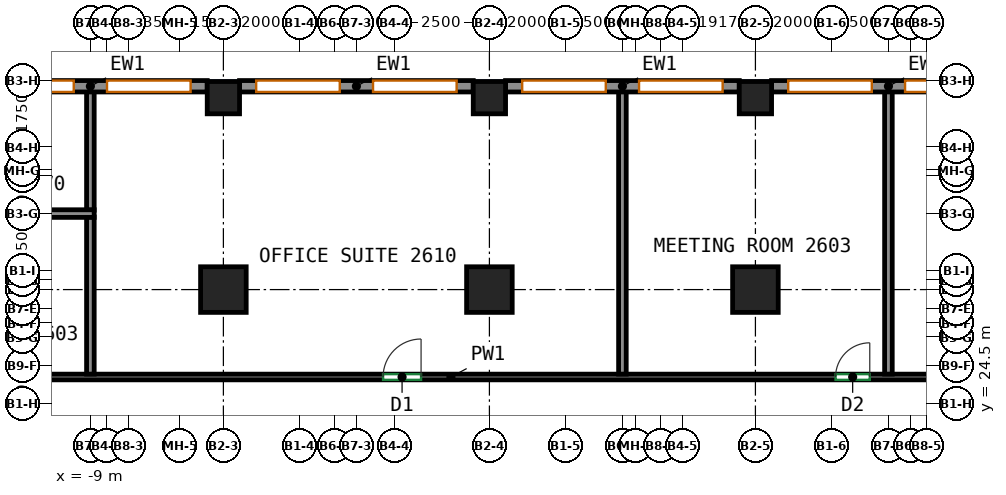
"""IFC4 building model, lengths in metres.
Left out: names, types, materials, properties, quantities, classifications, styles, units other than length and angle.
Written with IfcOpenShell. Run it as: python <this file> out.ifc"""

import sys

from ifc_helpers import new_model, si_unit, direction, frame, frame_2d, origin, origin_2d, place, context, subcontext, project, spatial, rectangle, extrude, source, transform, mapped, element, fill, save


model = new_model("IFC4")
c1 = context("Model", 3, precision=1e-05, world=origin(), true_north=direction((0.0, 1.0)))
c2 = subcontext(c1, "Body", "Model", "MODEL_VIEW")
j1 = project(units=[si_unit("LENGTHUNIT", "METRE"), si_unit("PLANEANGLEUNIT", "RADIAN")], contexts=[c1])
p1 = place(None, origin())
s1 = spatial("IfcSite", under=j1, at=p1, CompositionType="ELEMENT")
p2 = place(p1, origin())
s2 = spatial("IfcBuilding", under=s1, at=p2, CompositionType="ELEMENT")
p3 = place(p2, frame((0.0, 0.0, 112.6)))
s3 = spatial("IfcBuildingStorey", under=s2, at=p3, CompositionType="ELEMENT", Elevation=112.6)
m1 = source(origin(), c2, "Body", "SweptSolid", [
    extrude(rectangle(XDim=1.2, YDim=1.2, at=origin_2d()), origin(), (0.0, 0.0, 1.0), 3.72),
])
p4 = place(p3, frame((-5.5, 27.5, 0.0), z_axis=(0.0, 0.0, 1.0), x_axis=(1.0, 0.0, 0.0)))
e1 = element("IfcColumn", 1, at=p4, inside=s3, PredefinedType="COLUMN", context=c2, shape_type="MappedRepresentation", body=[
    mapped(m1, transform((0.0, 0.0, 0.0))),
])
m2 = source(origin(), c2, "Body", "SweptSolid", [
    extrude(rectangle(XDim=0.85, YDim=0.85, at=origin_2d()), origin(), (0.0, 0.0, 1.0), 3.72),
])
p5 = place(p3, frame((-5.5, 32.55, 0.0), z_axis=(0.0, 0.0, 1.0), x_axis=(1.0, 0.0, 0.0)))
e2 = element("IfcColumn", 2, at=p5, inside=s3, PredefinedType="COLUMN", context=c2, shape_type="MappedRepresentation", body=[
    mapped(m2, transform((0.0, 0.0, 0.0))),
])
p6 = place(p3, frame((1.5, 27.5, 0.0), z_axis=(0.0, 0.0, 1.0), x_axis=(1.0, 0.0, 0.0)))
e3 = element("IfcColumn", 3, at=p6, inside=s3, PredefinedType="COLUMN", context=c2, shape_type="MappedRepresentation", body=[
    mapped(m1, transform((0.0, 0.0, 0.0))),
])
p7 = place(p3, frame((1.5, 32.55, 0.0), z_axis=(0.0, 0.0, 1.0), x_axis=(1.0, 0.0, 0.0)))
e4 = element("IfcColumn", 4, at=p7, inside=s3, PredefinedType="COLUMN", context=c2, shape_type="MappedRepresentation", body=[
    mapped(m2, transform((0.0, 0.0, 0.0))),
])
p8 = place(p3, frame((8.5, 27.5, 0.0), z_axis=(0.0, 0.0, 1.0), x_axis=(1.0, 0.0, 0.0)))
e5 = element("IfcColumn", 5, at=p8, inside=s3, PredefinedType="COLUMN", context=c2, shape_type="MappedRepresentation", body=[
    mapped(m1, transform((0.0, 0.0, 0.0))),
])
p9 = place(p3, frame((8.5, 32.55, 0.0), z_axis=(0.0, 0.0, 1.0), x_axis=(1.0, 0.0, 0.0)))
e6 = element("IfcColumn", 6, at=p9, inside=s3, PredefinedType="COLUMN", context=c2, shape_type="MappedRepresentation", body=[
    mapped(m2, transform((0.0, 0.0, 0.0))),
])
m3 = source(origin(), c2, "Body", "SweptSolid", [
    extrude(rectangle(XDim=6.15, YDim=0.3, at=frame_2d((3.075, 0.0))), origin(), (0.0, 0.0, 1.0), 3.72),
])
p10 = place(p3, frame((15.075, 32.85, 0.0), z_axis=(0.0, 0.0, 1.0), x_axis=(-1.0, 0.0, 0.0)))
e7 = element("IfcWall", 7, at=p10, inside=s3, PredefinedType="SOLIDWALL", context=c2, shape_type="MappedRepresentation", body=[
    mapped(m3, transform((0.0, 0.0, 0.0))),
])
p11 = place(p10, frame((0.438, 0.0, 0.7)))
e8 = element("IfcOpeningElement", 8, at=p11, cuts=e7, PredefinedType="OPENING", context=c2, shape_type="SweptSolid", body=[
    extrude(rectangle(XDim=2.2, YDim=2.25, at=frame_2d((1.1, 1.125))), frame((0.0, 0.16, 0.0), z_axis=(0.0, -1.0, 0.0), x_axis=(1.0, 0.0, 0.0)), (0.0, 0.0, 1.0), 0.32),
])
p12 = place(p10, frame((3.512, 0.0, 0.7)))
e9 = element("IfcOpeningElement", 9, at=p12, cuts=e7, PredefinedType="OPENING", context=c2, shape_type="SweptSolid", body=[
    extrude(rectangle(XDim=2.2, YDim=2.25, at=frame_2d((1.1, 1.125))), frame((0.0, 0.16, 0.0), z_axis=(0.0, -1.0, 0.0), x_axis=(1.0, 0.0, 0.0)), (0.0, 0.0, 1.0), 0.32),
])
p13 = place(p3, frame((8.075, 32.85, 0.0), z_axis=(0.0, 0.0, 1.0), x_axis=(-1.0, 0.0, 0.0)))
e10 = element("IfcWall", 10, at=p13, inside=s3, PredefinedType="SOLIDWALL", context=c2, shape_type="MappedRepresentation", body=[
    mapped(m3, transform((0.0, 0.0, 0.0))),
])
p14 = place(p13, frame((0.438, 0.0, 0.7)))
e11 = element("IfcOpeningElement", 11, at=p14, cuts=e10, PredefinedType="OPENING", context=c2, shape_type="SweptSolid", body=[
    extrude(rectangle(XDim=2.2, YDim=2.25, at=frame_2d((1.1, 1.125))), frame((0.0, 0.16, 0.0), z_axis=(0.0, -1.0, 0.0), x_axis=(1.0, 0.0, 0.0)), (0.0, 0.0, 1.0), 0.32),
])
p15 = place(p13, frame((3.512, 0.0, 0.7)))
e12 = element("IfcOpeningElement", 12, at=p15, cuts=e10, PredefinedType="OPENING", context=c2, shape_type="SweptSolid", body=[
    extrude(rectangle(XDim=2.2, YDim=2.25, at=frame_2d((1.1, 1.125))), frame((0.0, 0.16, 0.0), z_axis=(0.0, -1.0, 0.0), x_axis=(1.0, 0.0, 0.0)), (0.0, 0.0, 1.0), 0.32),
])
p16 = place(p3, frame((1.075, 32.85, 0.0), z_axis=(0.0, 0.0, 1.0), x_axis=(-1.0, 0.0, 0.0)))
e13 = element("IfcWall", 13, at=p16, inside=s3, PredefinedType="SOLIDWALL", context=c2, shape_type="MappedRepresentation", body=[
    mapped(m3, transform((0.0, 0.0, 0.0))),
])
p17 = place(p16, frame((0.438, 0.0, 0.7)))
e14 = element("IfcOpeningElement", 14, at=p17, cuts=e13, PredefinedType="OPENING", context=c2, shape_type="SweptSolid", body=[
    extrude(rectangle(XDim=2.2, YDim=2.25, at=frame_2d((1.1, 1.125))), frame((0.0, 0.16, 0.0), z_axis=(0.0, -1.0, 0.0), x_axis=(1.0, 0.0, 0.0)), (0.0, 0.0, 1.0), 0.32),
])
p18 = place(p16, frame((3.512, 0.0, 0.7)))
e15 = element("IfcOpeningElement", 15, at=p18, cuts=e13, PredefinedType="OPENING", context=c2, shape_type="SweptSolid", body=[
    extrude(rectangle(XDim=2.2, YDim=2.25, at=frame_2d((1.1, 1.125))), frame((0.0, 0.16, 0.0), z_axis=(0.0, -1.0, 0.0), x_axis=(1.0, 0.0, 0.0)), (0.0, 0.0, 1.0), 0.32),
])
p19 = place(p3, frame((-5.925, 32.85, 0.0), z_axis=(0.0, 0.0, 1.0), x_axis=(-1.0, 0.0, 0.0)))
e16 = element("IfcWall", 16, at=p19, inside=s3, PredefinedType="SOLIDWALL", context=c2, shape_type="MappedRepresentation", body=[
    mapped(m3, transform((0.0, 0.0, 0.0))),
])
p20 = place(p19, frame((0.438, 0.0, 0.7)))
e17 = element("IfcOpeningElement", 17, at=p20, cuts=e16, PredefinedType="OPENING", context=c2, shape_type="SweptSolid", body=[
    extrude(rectangle(XDim=2.2, YDim=2.25, at=frame_2d((1.1, 1.125))), frame((0.0, 0.16, 0.0), z_axis=(0.0, -1.0, 0.0), x_axis=(1.0, 0.0, 0.0)), (0.0, 0.0, 1.0), 0.32),
])
p21 = place(p19, frame((3.512, 0.0, 0.7)))
e18 = element("IfcOpeningElement", 18, at=p21, cuts=e16, PredefinedType="OPENING", context=c2, shape_type="SweptSolid", body=[
    extrude(rectangle(XDim=2.2, YDim=2.25, at=frame_2d((1.1, 1.125))), frame((0.0, 0.16, 0.0), z_axis=(0.0, -1.0, 0.0), x_axis=(1.0, 0.0, 0.0)), (0.0, 0.0, 1.0), 0.32),
])
p22 = place(p3, frame((-19.6, 25.2, 0.0), z_axis=(0.0, 0.0, 1.0), x_axis=(1.0, 0.0, 0.0)))
e19 = element("IfcWall", 19, at=p22, inside=s3, PredefinedType="PARTITIONING", context=c2, shape_type="SweptSolid", body=[
    extrude(rectangle(XDim=40.175, YDim=0.15, at=frame_2d((20.087, 0.0))), origin(), (0.0, 0.0, 1.0), 3.72),
])
p23 = place(p22, frame((1.104, 0.0, 0.0)))
e20 = element("IfcOpeningElement", 20, at=p23, cuts=e19, PredefinedType="OPENING", context=c2, shape_type="SweptSolid", body=[
    extrude(rectangle(XDim=0.9, YDim=2.1, at=frame_2d((0.45, 1.05))), frame((0.0, 0.085, 0.0), z_axis=(0.0, -1.0, 0.0), x_axis=(1.0, 0.0, 0.0)), (0.0, 0.0, 1.0), 0.17),
])
p24 = place(p22, frame((5.296, 0.0, 0.0)))
e21 = element("IfcOpeningElement", 21, at=p24, cuts=e19, PredefinedType="OPENING", context=c2, shape_type="SweptSolid", body=[
    extrude(rectangle(XDim=0.9, YDim=2.1, at=frame_2d((0.45, 1.05))), frame((0.0, 0.085, 0.0), z_axis=(0.0, -1.0, 0.0), x_axis=(1.0, 0.0, 0.0)), (0.0, 0.0, 1.0), 0.17),
])
p25 = place(p22, frame((18.302, 0.0, 0.0)))
e22 = element("IfcOpeningElement", 22, at=p25, cuts=e19, PredefinedType="OPENING", context=c2, shape_type="SweptSolid", body=[
    extrude(rectangle(XDim=1.0, YDim=2.1, at=frame_2d((0.5, 1.05))), frame((0.0, 0.085, 0.0), z_axis=(0.0, -1.0, 0.0), x_axis=(1.0, 0.0, 0.0)), (0.0, 0.0, 1.0), 0.17),
])
p26 = place(p22, frame((30.209, 0.0, 0.0)))
e23 = element("IfcOpeningElement", 23, at=p26, cuts=e19, PredefinedType="OPENING", context=c2, shape_type="SweptSolid", body=[
    extrude(rectangle(XDim=0.9, YDim=2.1, at=frame_2d((0.45, 1.05))), frame((0.0, 0.085, 0.0), z_axis=(0.0, -1.0, 0.0), x_axis=(1.0, 0.0, 0.0)), (0.0, 0.0, 1.0), 0.17),
])
p27 = place(p22, frame((32.702, 0.0, 0.0)))
e24 = element("IfcOpeningElement", 24, at=p27, cuts=e19, PredefinedType="OPENING", context=c2, shape_type="SweptSolid", body=[
    extrude(rectangle(XDim=1.8, YDim=2.1, at=frame_2d((0.9, 1.05))), frame((0.0, 0.085, 0.0), z_axis=(0.0, -1.0, 0.0), x_axis=(1.0, 0.0, 0.0)), (0.0, 0.0, 1.0), 0.17),
])
for number, where, z_axis, x_axis in (
    (25, (12.0, 25.276, 0.0), (0.0, 0.0, 1.0), (0.0, 1.0, 0.0)),
    (26, (5.0, 25.276, 0.0), (0.0, 0.0, 1.0), (0.0, 1.0, 0.0)),
):
    element("IfcWall", number, at=place(p3, frame(where, z_axis=z_axis, x_axis=x_axis)), inside=s3, PredefinedType="PARTITIONING", context=c2, shape_type="SweptSolid", body=[
        extrude(rectangle(XDim=7.474, YDim=0.2, at=frame_2d((3.737, 0.0))), origin(), (0.0, 0.0, 1.0), 3.72),
    ])
p28 = place(p3, frame((-9.0, 25.276, 0.0), z_axis=(0.0, 0.0, 1.0), x_axis=(0.0, 1.0, 0.0)))
e27 = element("IfcWall", 27, at=p28, inside=s3, PredefinedType="PARTITIONING", context=c2, shape_type="SweptSolid", body=[
    extrude(rectangle(XDim=4.134, YDim=0.2, at=frame_2d((2.067, 0.0))), origin(), (0.0, 0.0, 1.0), 3.72),
])
p29 = place(p3, frame((-9.0, 29.59, 0.0), z_axis=(0.0, 0.0, 1.0), x_axis=(0.0, 1.0, 0.0)))
e28 = element("IfcWall", 28, at=p29, inside=s3, PredefinedType="PARTITIONING", context=c2, shape_type="SweptSolid", body=[
    extrude(rectangle(XDim=3.16, YDim=0.2, at=frame_2d((1.58, 0.0))), origin(), (0.0, 0.0, 1.0), 3.72),
])
p30 = place(p3, frame((-19.6, 29.5, 0.0), z_axis=(0.0, 0.0, 1.0), x_axis=(1.0, 0.0, 0.0)))
e29 = element("IfcWall", 29, at=p30, inside=s3, PredefinedType="PARTITIONING", context=c2, shape_type="SweptSolid", body=[
    extrude(rectangle(XDim=10.7, YDim=0.2, at=frame_2d((5.35, 0.0))), origin(), (0.0, 0.0, 1.0), 3.07),
])
p31 = place(p11, origin())
e30 = element("IfcWindow", 30, at=p31, inside=s3, PartitioningType="SINGLE_PANEL", PredefinedType="WINDOW", context=c2, shape_type="SweptSolid", body=[
    extrude(rectangle(XDim=2.2, YDim=2.25, at=frame_2d((1.1, 1.125))), frame((0.0, 0.03, 0.0), z_axis=(0.0, -1.0, 0.0), x_axis=(1.0, 0.0, 0.0)), (0.0, 0.0, 1.0), 0.06),
])
fill(e8, e30)
p32 = place(p12, origin())
e31 = element("IfcWindow", 31, at=p32, inside=s3, PartitioningType="SINGLE_PANEL", PredefinedType="WINDOW", context=c2, shape_type="SweptSolid", body=[
    extrude(rectangle(XDim=2.2, YDim=2.25, at=frame_2d((1.1, 1.125))), frame((0.0, 0.03, 0.0), z_axis=(0.0, -1.0, 0.0), x_axis=(1.0, 0.0, 0.0)), (0.0, 0.0, 1.0), 0.06),
])
fill(e9, e31)
p33 = place(p14, origin())
e32 = element("IfcWindow", 32, at=p33, inside=s3, PartitioningType="SINGLE_PANEL", PredefinedType="WINDOW", context=c2, shape_type="SweptSolid", body=[
    extrude(rectangle(XDim=2.2, YDim=2.25, at=frame_2d((1.1, 1.125))), frame((0.0, 0.03, 0.0), z_axis=(0.0, -1.0, 0.0), x_axis=(1.0, 0.0, 0.0)), (0.0, 0.0, 1.0), 0.06),
])
fill(e11, e32)
p34 = place(p15, origin())
e33 = element("IfcWindow", 33, at=p34, inside=s3, PartitioningType="SINGLE_PANEL", PredefinedType="WINDOW", context=c2, shape_type="SweptSolid", body=[
    extrude(rectangle(XDim=2.2, YDim=2.25, at=frame_2d((1.1, 1.125))), frame((0.0, 0.03, 0.0), z_axis=(0.0, -1.0, 0.0), x_axis=(1.0, 0.0, 0.0)), (0.0, 0.0, 1.0), 0.06),
])
fill(e12, e33)
p35 = place(p17, origin())
e34 = element("IfcWindow", 34, at=p35, inside=s3, PartitioningType="SINGLE_PANEL", PredefinedType="WINDOW", context=c2, shape_type="SweptSolid", body=[
    extrude(rectangle(XDim=2.2, YDim=2.25, at=frame_2d((1.1, 1.125))), frame((0.0, 0.03, 0.0), z_axis=(0.0, -1.0, 0.0), x_axis=(1.0, 0.0, 0.0)), (0.0, 0.0, 1.0), 0.06),
])
fill(e14, e34)
p36 = place(p18, origin())
e35 = element("IfcWindow", 35, at=p36, inside=s3, PartitioningType="SINGLE_PANEL", PredefinedType="WINDOW", context=c2, shape_type="SweptSolid", body=[
    extrude(rectangle(XDim=2.2, YDim=2.25, at=frame_2d((1.1, 1.125))), frame((0.0, 0.03, 0.0), z_axis=(0.0, -1.0, 0.0), x_axis=(1.0, 0.0, 0.0)), (0.0, 0.0, 1.0), 0.06),
])
fill(e15, e35)
p37 = place(p20, origin())
e36 = element("IfcWindow", 36, at=p37, inside=s3, PartitioningType="SINGLE_PANEL", PredefinedType="WINDOW", context=c2, shape_type="SweptSolid", body=[
    extrude(rectangle(XDim=2.2, YDim=2.25, at=frame_2d((1.1, 1.125))), frame((0.0, 0.03, 0.0), z_axis=(0.0, -1.0, 0.0), x_axis=(1.0, 0.0, 0.0)), (0.0, 0.0, 1.0), 0.06),
])
fill(e17, e36)
p38 = place(p21, origin())
e37 = element("IfcWindow", 37, at=p38, inside=s3, PartitioningType="SINGLE_PANEL", PredefinedType="WINDOW", context=c2, shape_type="SweptSolid", body=[
    extrude(rectangle(XDim=2.2, YDim=2.25, at=frame_2d((1.1, 1.125))), frame((0.0, 0.03, 0.0), z_axis=(0.0, -1.0, 0.0), x_axis=(1.0, 0.0, 0.0)), (0.0, 0.0, 1.0), 0.06),
])
fill(e18, e37)
p39 = place(p25, origin())
e38 = element("IfcDoor", 38, at=p39, inside=s3, OperationType="SINGLE_SWING_RIGHT", PredefinedType="DOOR", context=c2, shape_type="SweptSolid", body=[
    extrude(rectangle(XDim=1.0, YDim=2.1, at=frame_2d((0.5, 1.05))), frame((0.0, 0.025, 0.0), z_axis=(0.0, -1.0, 0.0), x_axis=(1.0, 0.0, 0.0)), (0.0, 0.0, 1.0), 0.05),
])
fill(e22, e38)
p40 = place(p26, origin())
e39 = element("IfcDoor", 39, at=p40, inside=s3, OperationType="SINGLE_SWING_RIGHT", PredefinedType="DOOR", context=c2, shape_type="SweptSolid", body=[
    extrude(rectangle(XDim=0.9, YDim=2.1, at=frame_2d((0.45, 1.05))), frame((0.0, 0.025, 0.0), z_axis=(0.0, -1.0, 0.0), x_axis=(1.0, 0.0, 0.0)), (0.0, 0.0, 1.0), 0.05),
])
fill(e23, e39)
save(model, sys.argv[1])
